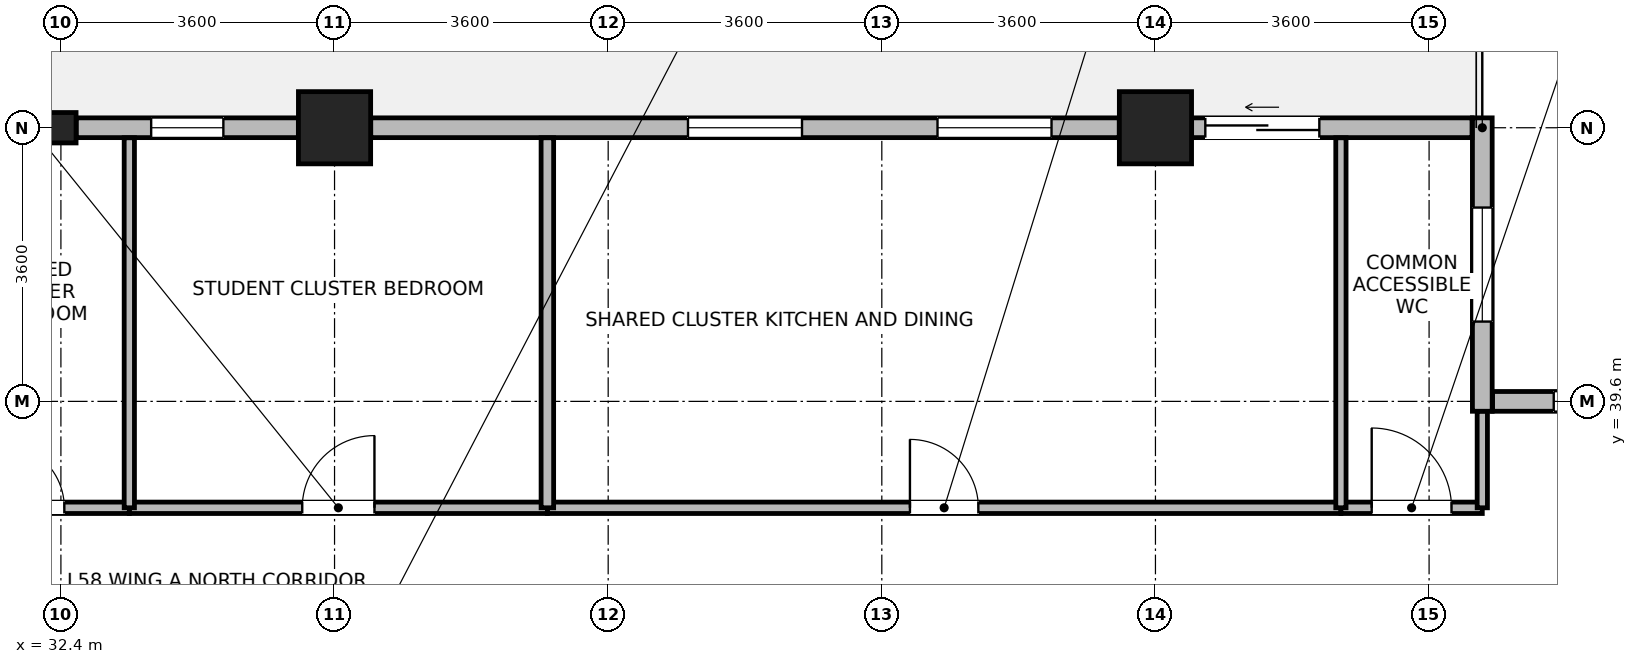
"""IFC4 building model, lengths in metres.
Left out: names, types, materials, properties, quantities, classifications, styles, units other than length and angle.
Written with IfcOpenShell. Run it as: python <this file> out.ifc"""

import sys

from ifc_helpers import new_model, si_unit, direction, frame, frame_2d, origin, origin_2d, place, context, subcontext, project, spatial, rectangle, i_section, extrude, source, transform, mapped, element, fill, save


model = new_model("IFC4")
c1 = context("Model", 3, precision=1e-05, world=origin(), true_north=direction((0.0, 1.0)))
c2 = subcontext(c1, "Body", "Model", "MODEL_VIEW")
j1 = project(units=[si_unit("LENGTHUNIT", "METRE"), si_unit("PLANEANGLEUNIT", "RADIAN")], contexts=[c1])
p1 = place(None, origin())
s1 = spatial("IfcSite", under=j1, at=p1, CompositionType="ELEMENT")
p2 = place(p1, origin())
s2 = spatial("IfcBuilding", under=s1, at=p2, CompositionType="ELEMENT")
p3 = place(p2, frame((0.0, 0.0, 227.7)))
s3 = spatial("IfcBuildingStorey", under=s2, at=p3, CompositionType="ELEMENT", Elevation=227.7)
m1 = source(origin(), c2, "Body", "SweptSolid", [
    extrude(rectangle(XDim=0.95, YDim=0.95, at=origin_2d()), origin(), (0.0, 0.0, 1.0), 3.7),
])
for number, where, z_axis, x_axis in (
    (1, (36.0, 43.2, 0.0), (0.0, 0.0, 1.0), (1.0, 0.0, 0.0)),
    (2, (46.8, 43.2, 0.0), (0.0, 0.0, 1.0), (1.0, 0.0, 0.0)),
):
    element("IfcColumn", number, at=place(p3, frame(where, z_axis=z_axis, x_axis=x_axis)), inside=s3, PredefinedType="COLUMN", context=c2, shape_type="MappedRepresentation", body=[
        mapped(m1, transform((0.0, 0.0, 0.0), x_axis=(1.0, 0.0, 0.0), y_axis=(0.0, 1.0, 0.0), z_axis=(0.0, 0.0, 1.0), scale=1.0)),
    ])
m2 = source(origin(), c2, "Body", "SweptSolid", [
    extrude(i_section(OverallWidth=0.399, OverallDepth=0.4, WebThickness=0.017, FlangeThickness=0.023, FilletRadius=0.015, at=origin_2d()), origin(), (0.0, 0.0, 1.0), 3.7),
])
p4 = place(p3, frame((32.4, 43.2, 0.0), z_axis=(0.0, 0.0, 1.0), x_axis=(1.0, 0.0, 0.0)))
e3 = element("IfcColumn", 3, at=p4, inside=s3, PredefinedType="COLUMN", context=c2, shape_type="MappedRepresentation", body=[
    mapped(m2, transform((0.0, 0.0, 0.0), x_axis=(1.0, 0.0, 0.0), y_axis=(0.0, 1.0, 0.0), z_axis=(0.0, 0.0, 1.0), scale=1.0)),
])
p5 = place(p3, frame((51.235, 39.6, 0.0), z_axis=(0.0, 0.0, 1.0), x_axis=(1.0, 0.0, 0.0)))
e4 = element("IfcWall", 4, at=p5, inside=s3, PredefinedType="STANDARD", context=c2, shape_type="SweptSolid", body=[
    extrude(rectangle(XDim=9.33, YDim=0.26, at=frame_2d((4.665, 0.0))), origin(), (0.0, 0.0, 1.0), 3.45),
])
p6 = place(p5, frame((0.805, 0.0, 0.85)))
e5 = element("IfcOpeningElement", 5, at=p6, cuts=e4, PredefinedType="OPENING", context=c2, shape_type="SweptSolid", body=[
    extrude(rectangle(XDim=1.5, YDim=1.85, at=frame_2d((0.75, 0.925))), frame((0.0, 0.14, 0.0), z_axis=(0.0, -1.0, 0.0), x_axis=(1.0, 0.0, 0.0)), (0.0, 0.0, 1.0), 0.28),
])
p7 = place(p5, frame((3.915, 0.0, 0.85)))
e6 = element("IfcOpeningElement", 6, at=p7, cuts=e4, PredefinedType="OPENING", context=c2, shape_type="SweptSolid", body=[
    extrude(rectangle(XDim=1.5, YDim=1.85, at=frame_2d((0.75, 0.925))), frame((0.0, 0.14, 0.0), z_axis=(0.0, -1.0, 0.0), x_axis=(1.0, 0.0, 0.0)), (0.0, 0.0, 1.0), 0.28),
])
p8 = place(p5, frame((7.025, 0.0, 0.85)))
e7 = element("IfcOpeningElement", 7, at=p8, cuts=e4, PredefinedType="OPENING", context=c2, shape_type="SweptSolid", body=[
    extrude(rectangle(XDim=1.5, YDim=1.85, at=frame_2d((0.75, 0.925))), frame((0.0, 0.14, 0.0), z_axis=(0.0, -1.0, 0.0), x_axis=(1.0, 0.0, 0.0)), (0.0, 0.0, 1.0), 0.28),
])
p9 = place(p3, frame((51.1, 43.33, 0.0), z_axis=(0.0, 0.0, 1.0), x_axis=(0.0, -1.0, 0.0)))
e8 = element("IfcWall", 8, at=p9, inside=s3, PredefinedType="STANDARD", context=c2, shape_type="SweptSolid", body=[
    extrude(rectangle(XDim=3.86, YDim=0.26, at=frame_2d((1.93, 0.0))), origin(), (0.0, 0.0, 1.0), 3.45),
])
p10 = place(p9, frame((1.18, 0.0, 0.85)))
e9 = element("IfcOpeningElement", 9, at=p10, cuts=e8, PredefinedType="OPENING", context=c2, shape_type="SweptSolid", body=[
    extrude(rectangle(XDim=1.5, YDim=1.85, at=frame_2d((0.75, 0.925))), frame((0.0, 0.14, 0.0), z_axis=(0.0, -1.0, 0.0), x_axis=(1.0, 0.0, 0.0)), (0.0, 0.0, 1.0), 0.28),
])
p11 = place(p3, frame((47.276, 43.2, 0.0), z_axis=(0.0, 0.0, 1.0), x_axis=(1.0, 0.0, 0.0)))
e10 = element("IfcWall", 10, at=p11, inside=s3, PredefinedType="STANDARD", context=c2, shape_type="SweptSolid", body=[
    extrude(rectangle(XDim=3.689, YDim=0.26, at=frame_2d((1.845, 0.0))), origin(), (0.0, 0.0, 1.0), 3.45),
])
p12 = place(p11, frame((0.18, 0.0, 0.0)))
e11 = element("IfcOpeningElement", 11, at=p12, cuts=e10, PredefinedType="OPENING", context=c2, shape_type="SweptSolid", body=[
    extrude(rectangle(XDim=1.5, YDim=2.15, at=frame_2d((0.75, 1.075))), frame((0.0, 0.14, 0.0), z_axis=(0.0, -1.0, 0.0), x_axis=(1.0, 0.0, 0.0)), (0.0, 0.0, 1.0), 0.28),
])
p13 = place(p3, frame((36.476, 43.2, 0.0), z_axis=(0.0, 0.0, 1.0), x_axis=(1.0, 0.0, 0.0)))
e12 = element("IfcWall", 12, at=p13, inside=s3, PredefinedType="STANDARD", context=c2, shape_type="SweptSolid", body=[
    extrude(rectangle(XDim=9.848, YDim=0.26, at=frame_2d((4.924, 0.0))), origin(), (0.0, 0.0, 1.0), 3.05),
])
p14 = place(p13, frame((4.174, 0.0, 0.85)))
e13 = element("IfcOpeningElement", 13, at=p14, cuts=e12, PredefinedType="OPENING", context=c2, shape_type="SweptSolid", body=[
    extrude(rectangle(XDim=1.5, YDim=1.85, at=frame_2d((0.75, 0.925))), frame((0.0, 0.14, 0.0), z_axis=(0.0, -1.0, 0.0), x_axis=(1.0, 0.0, 0.0)), (0.0, 0.0, 1.0), 0.28),
])
p15 = place(p13, frame((7.457, 0.0, 0.85)))
e14 = element("IfcOpeningElement", 14, at=p15, cuts=e12, PredefinedType="OPENING", context=c2, shape_type="SweptSolid", body=[
    extrude(rectangle(XDim=1.5, YDim=1.85, at=frame_2d((0.75, 0.925))), frame((0.0, 0.14, 0.0), z_axis=(0.0, -1.0, 0.0), x_axis=(1.0, 0.0, 0.0)), (0.0, 0.0, 1.0), 0.28),
])
p16 = place(p3, frame((32.601, 43.2, 0.0), z_axis=(0.0, 0.0, 1.0), x_axis=(1.0, 0.0, 0.0)))
e15 = element("IfcWall", 15, at=p16, inside=s3, PredefinedType="STANDARD", context=c2, shape_type="SweptSolid", body=[
    extrude(rectangle(XDim=2.923, YDim=0.26, at=frame_2d((1.462, 0.0))), origin(), (0.0, 0.0, 1.0), 3.05),
])
p17 = place(p16, frame((0.987, 0.0, 0.85)))
e16 = element("IfcOpeningElement", 16, at=p17, cuts=e15, PredefinedType="OPENING", context=c2, shape_type="SweptSolid", body=[
    extrude(rectangle(XDim=0.95, YDim=1.75, at=frame_2d((0.475, 0.875))), frame((0.0, 0.14, 0.0), z_axis=(0.0, -1.0, 0.0), x_axis=(1.0, 0.0, 0.0)), (0.0, 0.0, 1.0), 0.28),
])
p18 = place(p3, frame((38.8, 38.2, 0.0), z_axis=(0.0, 0.0, 1.0), x_axis=(1.0, 0.0, 0.0)))
e17 = element("IfcWall", 17, at=p18, inside=s3, PredefinedType="PARTITIONING", context=c2, shape_type="SweptSolid", body=[
    extrude(rectangle(XDim=10.44, YDim=0.15, at=frame_2d((5.22, 0.0))), origin(), (0.0, 0.0, 1.0), 3.45),
])
p19 = place(p18, frame((4.77, 0.0, 0.0)))
e18 = element("IfcOpeningElement", 18, at=p19, cuts=e17, PredefinedType="OPENING", context=c2, shape_type="SweptSolid", body=[
    extrude(rectangle(XDim=0.9, YDim=2.08, at=frame_2d((0.45, 1.04))), frame((0.0, 0.085, 0.0), z_axis=(0.0, -1.0, 0.0), x_axis=(1.0, 0.0, 0.0)), (0.0, 0.0, 1.0), 0.17),
])
p20 = place(p3, frame((33.3, 38.2, 0.0), z_axis=(0.0, 0.0, 1.0), x_axis=(1.0, 0.0, 0.0)))
e19 = element("IfcWall", 19, at=p20, inside=s3, PredefinedType="PARTITIONING", context=c2, shape_type="SweptSolid", body=[
    extrude(rectangle(XDim=5.5, YDim=0.15, at=frame_2d((2.75, 0.0))), origin(), (0.0, 0.0, 1.0), 3.45),
])
p21 = place(p20, frame((2.275, 0.0, 0.0)))
e20 = element("IfcOpeningElement", 20, at=p21, cuts=e19, PredefinedType="OPENING", context=c2, shape_type="SweptSolid", body=[
    extrude(rectangle(XDim=0.95, YDim=2.1, at=frame_2d((0.475, 1.05))), frame((0.0, 0.085, 0.0), z_axis=(0.0, -1.0, 0.0), x_axis=(1.0, 0.0, 0.0)), (0.0, 0.0, 1.0), 0.17),
])
p22 = place(p3, frame((30.74, 38.2, 0.0), z_axis=(0.0, 0.0, 1.0), x_axis=(1.0, 0.0, 0.0)))
e21 = element("IfcWall", 21, at=p22, inside=s3, PredefinedType="PARTITIONING", context=c2, shape_type="SweptSolid", body=[
    extrude(rectangle(XDim=2.56, YDim=0.15, at=frame_2d((1.28, 0.0))), origin(), (0.0, 0.0, 1.0), 3.45),
])
p23 = place(p22, frame((0.855, 0.0, 0.0)))
e22 = element("IfcOpeningElement", 22, at=p23, cuts=e21, PredefinedType="OPENING", context=c2, shape_type="SweptSolid", body=[
    extrude(rectangle(XDim=0.85, YDim=2.04, at=frame_2d((0.425, 1.02))), frame((0.0, 0.085, 0.0), z_axis=(0.0, -1.0, 0.0), x_axis=(1.0, 0.0, 0.0)), (0.0, 0.0, 1.0), 0.17),
])
p24 = place(p3, frame((49.24, 38.2, 0.0), z_axis=(0.0, 0.0, 1.0), x_axis=(1.0, 0.0, 0.0)))
e23 = element("IfcWall", 23, at=p24, inside=s3, PredefinedType="PARTITIONING", context=c2, shape_type="SweptSolid", body=[
    extrude(rectangle(XDim=1.86, YDim=0.15, at=frame_2d((0.93, 0.0))), origin(), (0.0, 0.0, 1.0), 3.45),
])
p25 = place(p24, frame((0.405, 0.0, 0.0)))
e24 = element("IfcOpeningElement", 24, at=p25, cuts=e23, PredefinedType="OPENING", context=c2, shape_type="SweptSolid", body=[
    extrude(rectangle(XDim=1.05, YDim=2.12, at=frame_2d((0.525, 1.06))), frame((0.0, 0.085, 0.0), z_axis=(0.0, -1.0, 0.0), x_axis=(1.0, 0.0, 0.0)), (0.0, 0.0, 1.0), 0.17),
])
p26 = place(p3, frame((33.3, 38.2, 0.0), z_axis=(0.0, 0.0, 1.0), x_axis=(0.0, 1.0, 0.0)))
e25 = element("IfcWall", 25, at=p26, inside=s3, PredefinedType="PARTITIONING", context=c2, shape_type="SweptSolid", body=[
    extrude(rectangle(XDim=4.868, YDim=0.135, at=frame_2d((2.434, 0.0))), origin(), (0.0, 0.0, 1.0), 3.45),
])
p27 = place(p3, frame((38.8, 38.2, 0.0), z_axis=(0.0, 0.0, 1.0), x_axis=(0.0, 1.0, 0.0)))
e26 = element("IfcWall", 26, at=p27, inside=s3, PredefinedType="PARTITIONING", context=c2, shape_type="SweptSolid", body=[
    extrude(rectangle(XDim=4.868, YDim=0.165, at=frame_2d((2.434, 0.0))), origin(), (0.0, 0.0, 1.0), 3.45),
])
p28 = place(p3, frame((49.24, 38.2, 0.0), z_axis=(0.0, 0.0, 1.0), x_axis=(0.0, 1.0, 0.0)))
e27 = element("IfcWall", 27, at=p28, inside=s3, PredefinedType="PARTITIONING", context=c2, shape_type="SweptSolid", body=[
    extrude(rectangle(XDim=4.868, YDim=0.135, at=frame_2d((2.434, 0.0))), origin(), (0.0, 0.0, 1.0), 3.45),
])
p29 = place(p3, frame((51.1, 38.2, 0.0), z_axis=(0.0, 0.0, 1.0), x_axis=(0.0, 1.0, 0.0)))
e28 = element("IfcWall", 28, at=p29, inside=s3, PredefinedType="PARTITIONING", context=c2, shape_type="SweptSolid", body=[
    extrude(rectangle(XDim=1.268, YDim=0.135, at=frame_2d((0.634, 0.0))), origin(), (0.0, 0.0, 1.0), 3.45),
])
p30 = place(p6, origin())
e29 = element("IfcWindow", 29, at=p30, inside=s3, PartitioningType="SINGLE_PANEL", PredefinedType="WINDOW", context=c2, shape_type="SweptSolid", body=[
    extrude(rectangle(XDim=1.5, YDim=1.85, at=frame_2d((0.75, 0.925))), frame((0.0, 0.03, 0.0), z_axis=(0.0, -1.0, 0.0), x_axis=(1.0, 0.0, 0.0)), (0.0, 0.0, 1.0), 0.06),
])
fill(e5, e29)
p31 = place(p10, origin())
e30 = element("IfcWindow", 30, at=p31, inside=s3, PartitioningType="SINGLE_PANEL", PredefinedType="WINDOW", context=c2, shape_type="SweptSolid", body=[
    extrude(rectangle(XDim=1.5, YDim=1.85, at=frame_2d((0.75, 0.925))), frame((0.0, 0.03, 0.0), z_axis=(0.0, -1.0, 0.0), x_axis=(1.0, 0.0, 0.0)), (0.0, 0.0, 1.0), 0.06),
])
fill(e9, e30)
p32 = place(p12, origin())
e31 = element("IfcDoor", 31, at=p32, inside=s3, OperationType="SLIDING_TO_LEFT", PredefinedType="DOOR", context=c2, shape_type="SweptSolid", body=[
    extrude(rectangle(XDim=1.5, YDim=2.15, at=frame_2d((0.75, 1.075))), frame((0.0, 0.025, 0.0), z_axis=(0.0, -1.0, 0.0), x_axis=(1.0, 0.0, 0.0)), (0.0, 0.0, 1.0), 0.05),
])
fill(e11, e31)
p33 = place(p14, origin())
e32 = element("IfcWindow", 32, at=p33, inside=s3, PartitioningType="SINGLE_PANEL", PredefinedType="WINDOW", context=c2, shape_type="SweptSolid", body=[
    extrude(rectangle(XDim=1.5, YDim=1.85, at=frame_2d((0.75, 0.925))), frame((0.0, 0.03, 0.0), z_axis=(0.0, -1.0, 0.0), x_axis=(1.0, 0.0, 0.0)), (0.0, 0.0, 1.0), 0.06),
])
fill(e13, e32)
p34 = place(p15, origin())
e33 = element("IfcWindow", 33, at=p34, inside=s3, PartitioningType="SINGLE_PANEL", PredefinedType="WINDOW", context=c2, shape_type="SweptSolid", body=[
    extrude(rectangle(XDim=1.5, YDim=1.85, at=frame_2d((0.75, 0.925))), frame((0.0, 0.03, 0.0), z_axis=(0.0, -1.0, 0.0), x_axis=(1.0, 0.0, 0.0)), (0.0, 0.0, 1.0), 0.06),
])
fill(e14, e33)
p35 = place(p17, origin())
e34 = element("IfcWindow", 34, at=p35, inside=s3, PartitioningType="SINGLE_PANEL", PredefinedType="WINDOW", context=c2, shape_type="SweptSolid", body=[
    extrude(rectangle(XDim=0.95, YDim=1.75, at=frame_2d((0.475, 0.875))), frame((0.0, 0.03, 0.0), z_axis=(0.0, -1.0, 0.0), x_axis=(1.0, 0.0, 0.0)), (0.0, 0.0, 1.0), 0.06),
])
fill(e16, e34)
p36 = place(p19, origin())
e35 = element("IfcDoor", 35, at=p36, inside=s3, OperationType="SINGLE_SWING_LEFT", PredefinedType="DOOR", context=c2, shape_type="SweptSolid", body=[
    extrude(rectangle(XDim=0.9, YDim=2.08, at=frame_2d((0.45, 1.04))), frame((0.0, 0.025, 0.0), z_axis=(0.0, -1.0, 0.0), x_axis=(1.0, 0.0, 0.0)), (0.0, 0.0, 1.0), 0.05),
])
fill(e18, e35)
p37 = place(p21, origin())
e36 = element("IfcDoor", 36, at=p37, inside=s3, OperationType="SINGLE_SWING_RIGHT", PredefinedType="DOOR", context=c2, shape_type="SweptSolid", body=[
    extrude(rectangle(XDim=0.95, YDim=2.1, at=frame_2d((0.475, 1.05))), frame((0.0, 0.025, 0.0), z_axis=(0.0, -1.0, 0.0), x_axis=(1.0, 0.0, 0.0)), (0.0, 0.0, 1.0), 0.05),
])
fill(e20, e36)
p38 = place(p23, origin())
e37 = element("IfcDoor", 37, at=p38, inside=s3, OperationType="SINGLE_SWING_LEFT", PredefinedType="DOOR", context=c2, shape_type="SweptSolid", body=[
    extrude(rectangle(XDim=0.85, YDim=2.04, at=frame_2d((0.425, 1.02))), frame((0.0, 0.025, 0.0), z_axis=(0.0, -1.0, 0.0), x_axis=(1.0, 0.0, 0.0)), (0.0, 0.0, 1.0), 0.05),
])
fill(e22, e37)
p39 = place(p25, origin())
e38 = element("IfcDoor", 38, at=p39, inside=s3, OperationType="SINGLE_SWING_LEFT", PredefinedType="DOOR", context=c2, shape_type="SweptSolid", body=[
    extrude(rectangle(XDim=1.05, YDim=2.12, at=frame_2d((0.525, 1.06))), frame((0.0, 0.025, 0.0), z_axis=(0.0, -1.0, 0.0), x_axis=(1.0, 0.0, 0.0)), (0.0, 0.0, 1.0), 0.05),
])
fill(e24, e38)
save(model, sys.argv[1])
